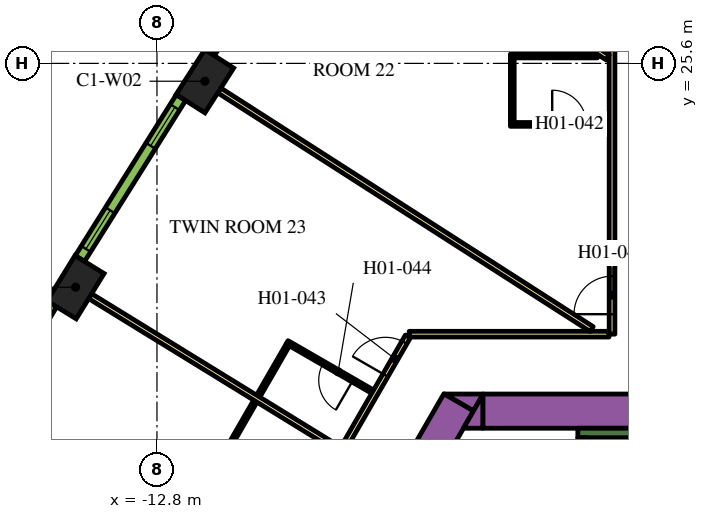
"""IFC4 building model, lengths in metres.
Left out: names, types, materials, properties, quantities, classifications, styles, units other than length and angle.
Written with IfcOpenShell. Run it as: python <this file> out.ifc"""

import sys

from ifc_helpers import new_model, si_unit, direction, frame, frame_2d, origin, origin_2d, place, context, subcontext, project, spatial, polyline, rectangle, outline, extrude, element, fill, save


model = new_model("IFC4")
c1 = context("Model", 3, precision=1e-05, world=origin(), true_north=direction((0.0, 1.0)))
c2 = subcontext(c1, "Body", "Model", "MODEL_VIEW")
j1 = project(units=[si_unit("LENGTHUNIT", "METRE"), si_unit("PLANEANGLEUNIT", "RADIAN")], contexts=[c1])
p1 = place(None, origin())
s1 = spatial("IfcSite", under=j1, at=p1, CompositionType="ELEMENT")
p2 = place(p1, origin())
s2 = spatial("IfcBuilding", under=s1, at=p2, CompositionType="ELEMENT")
p3 = place(p2, frame((0.0, 0.0, 35.4)))
s3 = spatial("IfcBuildingStorey", under=s2, at=p3, CompositionType="ELEMENT", Elevation=35.4)
for number, where, z_axis, x_axis in (
    (1, (-11.539, 25.131, 0.0), (0.0, 0.0, 1.0), (-0.539, -0.842, 0.0)),
    (2, (-14.942, 19.71, 0.0), (0.0, 0.0, 1.0), (-0.524, -0.852, 0.0)),
):
    element("IfcColumn", number, at=place(p3, frame(where, z_axis=z_axis, x_axis=x_axis)), inside=s3, PredefinedType="COLUMN", context=c2, shape_type="SweptSolid", body=[
        extrude(rectangle(XDim=1.4, YDim=0.9, at=origin_2d()), origin(), (0.0, 0.0, 1.0), 3.9),
    ])
p4 = place(p3, frame((-15.36, -1.503, 0.0), z_axis=(0.0, 0.0, 1.0), x_axis=(0.50000389221, 0.866023156604, 0.0)))
e3 = element("IfcWall", 3, at=p4, inside=s3, PredefinedType="SOLIDWALL", context=c2, shape_type="SweptSolid", body=[
    extrude(rectangle(XDim=21.0, YDim=0.9, at=frame_2d((10.5, 0.0))), origin(), (0.0, 0.0, 1.0), 3.9),
])
p5 = place(p3, origin())
e4 = element("IfcWall", 4, at=p5, inside=s3, PredefinedType="SOLIDWALL", context=c2, shape_type="SweptSolid", body=[
    extrude(outline(polyline([(-4.215, 16.9), (-4.469, 16.46), (-5.231, 16.9), (-4.215, 16.9)])), origin(), (0.0, 0.0, 1.0), 3.9),
])
p6 = place(p3, frame((-4.224, 16.45, 0.0), z_axis=(0.0, 0.0, 1.0), x_axis=(1.0, 0.0, 0.0)))
e5 = element("IfcWall", 5, at=p6, inside=s3, PredefinedType="SOLIDWALL", context=c2, shape_type="SweptSolid", body=[
    extrude(rectangle(XDim=9.488, YDim=0.9, at=frame_2d((4.744, 0.0))), origin(), (0.0, 0.0, 1.0), 3.9),
])
e6 = element("IfcWall", 6, at=p5, inside=s3, PredefinedType="SOLIDWALL", context=c2, shape_type="SweptSolid", body=[
    extrude(outline(polyline([(-4.734, 16.0), (-4.226, 16.88), (-4.226, 16.0), (-4.734, 16.0)])), origin(), (0.0, 0.0, 1.0), 3.9),
])
p7 = place(p3, frame((-1.725, 15.875, 0.0), z_axis=(0.0, 0.0, 1.0), x_axis=(1.0, 0.0, 0.0)))
e7 = element("IfcWall", 7, at=p7, inside=s3, PredefinedType="SOLIDWALL", context=c2, shape_type="SweptSolid", body=[
    extrude(rectangle(XDim=3.45, YDim=0.25, at=frame_2d((1.725, 0.0))), origin(), (0.0, 0.0, 1.0), 3.9),
])
p8 = place(p3, frame((-1.6, 8.7, 0.0), z_axis=(0.0, 0.0, 1.0), x_axis=(0.0, 1.0, 0.0)))
e8 = element("IfcWall", 8, at=p8, inside=s3, PredefinedType="SOLIDWALL", context=c2, shape_type="SweptSolid", body=[
    extrude(rectangle(XDim=7.05, YDim=0.25, at=frame_2d((3.525, 0.0))), origin(), (0.0, 0.0, 1.0), 3.9),
])
p9 = place(p3, frame((-0.825, 18.475, 0.0), z_axis=(0.0, 0.0, 1.0), x_axis=(0.0, 1.0, 0.0)))
e9 = element("IfcWall", 9, at=p9, inside=s3, PredefinedType="PARTITIONING", context=c2, shape_type="SweptSolid", body=[
    extrude(rectangle(XDim=16.224, YDim=0.15, at=frame_2d((8.112, 0.0))), origin(), (0.0, 0.0, 1.0), 2.75),
])
p10 = place(p9, frame((7.949, 0.0, 0.0)))
e10 = element("IfcOpeningElement", 10, at=p10, cuts=e9, PredefinedType="OPENING", context=c2, shape_type="SweptSolid", body=[
    extrude(rectangle(XDim=1.0, YDim=2.1, at=frame_2d((0.5, 1.05))), frame((0.0, 0.085, 0.0), z_axis=(0.0, -1.0, 0.0), x_axis=(1.0, 0.0, 0.0)), (0.0, 0.0, 1.0), 0.17),
])
p11 = place(p9, frame((0.526, 0.0, 0.0)))
e11 = element("IfcOpeningElement", 11, at=p11, cuts=e9, PredefinedType="OPENING", context=c2, shape_type="SweptSolid", body=[
    extrude(rectangle(XDim=1.0, YDim=2.1, at=frame_2d((0.5, 1.05))), frame((0.0, 0.085, 0.0), z_axis=(0.0, -1.0, 0.0), x_axis=(1.0, 0.0, 0.0)), (0.0, 0.0, 1.0), 0.17),
])
p12 = place(p3, frame((-6.163, 18.475, 0.0), z_axis=(0.0, 0.0, 1.0), x_axis=(1.0, 0.0, 0.0)))
e12 = element("IfcWall", 12, at=p12, inside=s3, PredefinedType="PARTITIONING", context=c2, shape_type="SweptSolid", body=[
    extrude(rectangle(XDim=5.258, YDim=0.15, at=frame_2d((2.629, 0.0))), origin(), (0.0, 0.0, 1.0), 2.75),
])
p13 = place(p3, frame((-19.081, -3.9, 0.0), z_axis=(0.0, 0.0, 1.0), x_axis=(0.499998313975, 0.866026377209, 0.0)))
e13 = element("IfcWall", 13, at=p13, inside=s3, PredefinedType="PARTITIONING", context=c2, shape_type="SweptSolid", body=[
    extrude(rectangle(XDim=25.766, YDim=0.15, at=frame_2d((12.883, 0.0))), origin(), (0.0, 0.0, 1.0), 2.75),
])
p14 = place(p13, frame((24.586, 0.0, 0.0)))
e14 = element("IfcOpeningElement", 14, at=p14, cuts=e13, PredefinedType="OPENING", context=c2, shape_type="SweptSolid", body=[
    extrude(rectangle(XDim=1.0, YDim=2.1, at=frame_2d((0.5, 1.05))), frame((0.0, 0.085, 0.0), z_axis=(0.0, -1.0, 0.0), x_axis=(1.0, 0.0, 0.0)), (0.0, 0.0, 1.0), 0.17),
])
p15 = place(p13, frame((16.196, 0.0, 0.0)))
e15 = element("IfcOpeningElement", 15, at=p15, cuts=e13, PredefinedType="OPENING", context=c2, shape_type="SweptSolid", body=[
    extrude(rectangle(XDim=1.0, YDim=2.1, at=frame_2d((0.5, 1.05))), frame((0.0, 0.085, 0.0), z_axis=(0.0, -1.0, 0.0), x_axis=(1.0, 0.0, 0.0)), (0.0, 0.0, 1.0), 0.17),
])
p16 = place(p13, frame((14.789, 0.0, 0.0)))
e16 = element("IfcOpeningElement", 16, at=p16, cuts=e13, PredefinedType="OPENING", context=c2, shape_type="SweptSolid", body=[
    extrude(rectangle(XDim=1.1, YDim=2.1, at=frame_2d((0.55, 1.05))), frame((0.0, 0.085, 0.0), z_axis=(0.0, -1.0, 0.0), x_axis=(1.0, 0.0, 0.0)), (0.0, 0.0, 1.0), 0.17),
])
p17 = place(p13, frame((3.698, 0.0, 0.0)))
e17 = element("IfcOpeningElement", 17, at=p17, cuts=e13, PredefinedType="OPENING", context=c2, shape_type="SweptSolid", body=[
    extrude(rectangle(XDim=1.0, YDim=2.1, at=frame_2d((0.5, 1.05))), frame((0.0, 0.085, 0.0), z_axis=(0.0, -1.0, 0.0), x_axis=(1.0, 0.0, 0.0)), (0.0, 0.0, 1.0), 0.17),
])
p18 = place(p13, frame((1.531, 0.0, 0.0)))
e18 = element("IfcOpeningElement", 18, at=p18, cuts=e13, PredefinedType="OPENING", context=c2, shape_type="SweptSolid", body=[
    extrude(rectangle(XDim=0.9, YDim=2.1, at=frame_2d((0.45, 1.05))), frame((0.0, 0.085, 0.0), z_axis=(0.0, -1.0, 0.0), x_axis=(1.0, 0.0, 0.0)), (0.0, 0.0, 1.0), 0.17),
])
p19 = place(p3, frame((-14.558, 19.475, 0.0), z_axis=(0.0, 0.0, 1.0), x_axis=(0.851829455142, -0.523819223925, 0.0)))
e19 = element("IfcWall", 19, at=p19, inside=s3, PredefinedType="PARTITIONING", context=c2, shape_type="SweptSolid", body=[
    extrude(rectangle(XDim=7.688, YDim=0.15, at=frame_2d((3.844, 0.0))), origin(), (0.0, 0.0, 1.0), 2.75),
])
p20 = place(p3, frame((-11.16, 24.888, 0.0), z_axis=(0.0, 0.0, 1.0), x_axis=(0.84199813156, -0.539480441211, 0.0)))
e20 = element("IfcWall", 20, at=p20, inside=s3, PredefinedType="PARTITIONING", context=c2, shape_type="SweptSolid", body=[
    extrude(rectangle(XDim=11.638, YDim=0.15, at=frame_2d((5.819, 0.0))), origin(), (0.0, 0.0, 1.0), 2.75),
])
p21 = place(p3, frame((-7.662, 30.238, 0.0), z_axis=(0.0, 0.0, 1.0), x_axis=(0.831882886825, -0.554951225431, 0.0)))
e21 = element("IfcWall", 21, at=p21, inside=s3, PredefinedType="PARTITIONING", context=c2, shape_type="SweptSolid", body=[
    extrude(rectangle(XDim=8.079, YDim=0.15, at=frame_2d((4.04, 0.0))), origin(), (0.0, 0.0, 1.0), 2.75),
])
p22 = place(p3, frame((-3.5, 23.995, 0.0), z_axis=(0.0, 0.0, 1.0), x_axis=(1.0, 0.0, 0.0)))
e22 = element("IfcWall", 22, at=p22, inside=s3, PredefinedType="PARTITIONING", context=c2, shape_type="SweptSolid", body=[
    extrude(rectangle(XDim=2.6, YDim=0.1, at=frame_2d((1.3, 0.0))), origin(), (0.0, 0.0, 1.0), 2.75),
])
p23 = place(p22, frame((1.1, 0.0, 0.0)))
e23 = element("IfcOpeningElement", 23, at=p23, cuts=e22, PredefinedType="OPENING", context=c2, shape_type="SweptSolid", body=[
    extrude(rectangle(XDim=0.9, YDim=2.1, at=frame_2d((0.45, 1.05))), frame((0.0, 0.06, 0.0), z_axis=(0.0, -1.0, 0.0), x_axis=(1.0, 0.0, 0.0)), (0.0, 0.0, 1.0), 0.12),
])
p24 = place(p3, frame((-3.45, 24.045, 0.0), z_axis=(0.0, 0.0, 1.0), x_axis=(0.0, 1.0, 0.0)))
e24 = element("IfcWall", 24, at=p24, inside=s3, PredefinedType="PARTITIONING", context=c2, shape_type="SweptSolid", body=[
    extrude(rectangle(XDim=1.7, YDim=0.1, at=frame_2d((0.85, 0.0))), origin(), (0.0, 0.0, 1.0), 2.75),
])
p25 = place(p3, frame((-1.21, 25.795, 0.0), z_axis=(0.0, 0.0, 1.0), x_axis=(-1.0, 0.0, 0.0)))
e25 = element("IfcWall", 25, at=p25, inside=s3, PredefinedType="PARTITIONING", context=c2, shape_type="SweptSolid", body=[
    extrude(rectangle(XDim=2.29, YDim=0.1, at=frame_2d((1.145, 0.0))), origin(), (0.0, 0.0, 1.0), 2.75),
])
p26 = place(p3, frame((-7.124, 16.961, 0.0), z_axis=(0.0, 0.0, 1.0), x_axis=(-0.866021400173, 0.500006934395, 0.0)))
e26 = element("IfcWall", 26, at=p26, inside=s3, PredefinedType="PARTITIONING", context=c2, shape_type="SweptSolid", body=[
    extrude(rectangle(XDim=2.6, YDim=0.1, at=frame_2d((1.3, 0.0))), origin(), (0.0, 0.0, 1.0), 2.75),
])
p27 = place(p26, frame((0.6, 0.0, 0.0)))
e27 = element("IfcOpeningElement", 27, at=p27, cuts=e26, PredefinedType="OPENING", context=c2, shape_type="SweptSolid", body=[
    extrude(rectangle(XDim=0.9, YDim=2.1, at=frame_2d((0.45, 1.05))), frame((0.0, 0.06, 0.0), z_axis=(0.0, -1.0, 0.0), x_axis=(1.0, 0.0, 0.0)), (0.0, 0.0, 1.0), 0.12),
])
p28 = place(p3, frame((-9.362, 18.184, 0.0), z_axis=(0.0, 0.0, 1.0), x_axis=(-0.499992328818, -0.866029832698, 0.0)))
e28 = element("IfcWall", 28, at=p28, inside=s3, PredefinedType="PARTITIONING", context=c2, shape_type="SweptSolid", body=[
    extrude(rectangle(XDim=1.54, YDim=0.1, at=frame_2d((0.77, 0.0))), origin(), (0.0, 0.0, 1.0), 2.75),
])
p29 = place(p3, frame((-11.061, 15.242, 0.0), z_axis=(0.0, 0.0, 1.0), x_axis=(0.499976720371, 0.866038843867, 0.0)))
e29 = element("IfcWall", 29, at=p29, inside=s3, PredefinedType="PARTITIONING", context=c2, shape_type="SweptSolid", body=[
    extrude(rectangle(XDim=1.69, YDim=0.1, at=frame_2d((0.845, 0.0))), origin(), (0.0, 0.0, 1.0), 2.75),
])
p30 = place(p3, frame((-8.676, 30.068, 0.0), z_axis=(0.0, 0.0, 1.0), x_axis=(-0.547204617628, -0.836998868845, 0.0)))
e30 = element("IfcWall", 30, at=p30, inside=s3, PredefinedType="SOLIDWALL", context=c2, shape_type="SweptSolid", body=[
    extrude(rectangle(XDim=4.998, YDim=0.29, at=frame_2d((2.499, 0.0))), origin(), (0.0, 0.0, 1.0), 3.65),
])
p31 = place(p30, frame((0.297, 0.0, 0.9)))
e31 = element("IfcOpeningElement", 31, at=p31, cuts=e30, PredefinedType="OPENING", context=c2, shape_type="SweptSolid", body=[
    extrude(rectangle(XDim=1.2, YDim=2.15, at=frame_2d((0.6, 1.075))), frame((0.0, 0.155, 0.0), z_axis=(0.0, -1.0, 0.0), x_axis=(1.0, 0.0, 0.0)), (0.0, 0.0, 1.0), 0.31),
])
p32 = place(p30, frame((3.501, 0.0, 0.9)))
e32 = element("IfcOpeningElement", 32, at=p32, cuts=e30, PredefinedType="OPENING", context=c2, shape_type="SweptSolid", body=[
    extrude(rectangle(XDim=1.2, YDim=2.15, at=frame_2d((0.6, 1.075))), frame((0.0, 0.155, 0.0), z_axis=(0.0, -1.0, 0.0), x_axis=(1.0, 0.0, 0.0)), (0.0, 0.0, 1.0), 0.31),
])
p33 = place(p3, frame((-12.17, 24.699, 0.0), z_axis=(0.0, 0.0, 1.0), x_axis=(-0.531688286542, -0.846940119462, 0.0)))
e33 = element("IfcWall", 33, at=p33, inside=s3, PredefinedType="SOLIDWALL", context=c2, shape_type="SweptSolid", body=[
    extrude(rectangle(XDim=4.998, YDim=0.29, at=frame_2d((2.499, 0.0))), origin(), (0.0, 0.0, 1.0), 3.65),
])
p34 = place(p33, frame((0.297, 0.0, 0.9)))
e34 = element("IfcOpeningElement", 34, at=p34, cuts=e33, PredefinedType="OPENING", context=c2, shape_type="SweptSolid", body=[
    extrude(rectangle(XDim=1.2, YDim=2.15, at=frame_2d((0.6, 1.075))), frame((0.0, 0.155, 0.0), z_axis=(0.0, -1.0, 0.0), x_axis=(1.0, 0.0, 0.0)), (0.0, 0.0, 1.0), 0.31),
])
p35 = place(p33, frame((3.501, 0.0, 0.9)))
e35 = element("IfcOpeningElement", 35, at=p35, cuts=e33, PredefinedType="OPENING", context=c2, shape_type="SweptSolid", body=[
    extrude(rectangle(XDim=1.2, YDim=2.15, at=frame_2d((0.6, 1.075))), frame((0.0, 0.155, 0.0), z_axis=(0.0, -1.0, 0.0), x_axis=(1.0, 0.0, 0.0)), (0.0, 0.0, 1.0), 0.31),
])
p36 = place(p3, frame((-15.564, 19.267, 0.0), z_axis=(0.0, 0.0, 1.0), x_axis=(-0.515938796285, -0.856625448191, 0.0)))
e36 = element("IfcWall", 36, at=p36, inside=s3, PredefinedType="SOLIDWALL", context=c2, shape_type="SweptSolid", body=[
    extrude(rectangle(XDim=4.998, YDim=0.29, at=frame_2d((2.499, 0.0))), origin(), (0.0, 0.0, 1.0), 3.65),
])
p37 = place(p36, frame((0.297, 0.0, 0.9)))
e37 = element("IfcOpeningElement", 37, at=p37, cuts=e36, PredefinedType="OPENING", context=c2, shape_type="SweptSolid", body=[
    extrude(rectangle(XDim=1.2, YDim=2.15, at=frame_2d((0.6, 1.075))), frame((0.0, 0.155, 0.0), z_axis=(0.0, -1.0, 0.0), x_axis=(1.0, 0.0, 0.0)), (0.0, 0.0, 1.0), 0.31),
])
p38 = place(p36, frame((3.501, 0.0, 0.9)))
e38 = element("IfcOpeningElement", 38, at=p38, cuts=e36, PredefinedType="OPENING", context=c2, shape_type="SweptSolid", body=[
    extrude(rectangle(XDim=1.2, YDim=2.15, at=frame_2d((0.6, 1.075))), frame((0.0, 0.155, 0.0), z_axis=(0.0, -1.0, 0.0), x_axis=(1.0, 0.0, 0.0)), (0.0, 0.0, 1.0), 0.31),
])
p39 = place(p11, origin())
e39 = element("IfcDoor", 39, at=p39, inside=s3, OperationType="SINGLE_SWING_LEFT", PredefinedType="DOOR", context=c2, shape_type="SweptSolid", body=[
    extrude(rectangle(XDim=1.0, YDim=2.1, at=frame_2d((0.5, 1.05))), frame((0.0, 0.025, 0.0), z_axis=(0.0, -1.0, 0.0), x_axis=(1.0, 0.0, 0.0)), (0.0, 0.0, 1.0), 0.05),
])
fill(e11, e39)
p40 = place(p23, origin())
e40 = element("IfcDoor", 40, at=p40, inside=s3, OperationType="SINGLE_SWING_LEFT", PredefinedType="DOOR", context=c2, shape_type="SweptSolid", body=[
    extrude(rectangle(XDim=0.9, YDim=2.1, at=frame_2d((0.45, 1.05))), frame((0.0, 0.025, 0.0), z_axis=(0.0, -1.0, 0.0), x_axis=(1.0, 0.0, 0.0)), (0.0, 0.0, 1.0), 0.05),
])
fill(e23, e40)
p41 = place(p14, origin())
e41 = element("IfcDoor", 41, at=p41, inside=s3, OperationType="SINGLE_SWING_RIGHT", PredefinedType="DOOR", context=c2, shape_type="SweptSolid", body=[
    extrude(rectangle(XDim=1.0, YDim=2.1, at=frame_2d((0.5, 1.05))), frame((0.0, 0.025, 0.0), z_axis=(0.0, -1.0, 0.0), x_axis=(1.0, 0.0, 0.0)), (0.0, 0.0, 1.0), 0.05),
])
fill(e14, e41)
p42 = place(p27, origin())
e42 = element("IfcDoor", 42, at=p42, inside=s3, OperationType="SINGLE_SWING_LEFT", PredefinedType="DOOR", context=c2, shape_type="SweptSolid", body=[
    extrude(rectangle(XDim=0.9, YDim=2.1, at=frame_2d((0.45, 1.05))), frame((0.0, 0.025, 0.0), z_axis=(0.0, -1.0, 0.0), x_axis=(1.0, 0.0, 0.0)), (0.0, 0.0, 1.0), 0.05),
])
fill(e27, e42)
p43 = place(p34, origin())
e43 = element("IfcWindow", 43, at=p43, inside=s3, PartitioningType="DOUBLE_PANEL_VERTICAL", PredefinedType="WINDOW", context=c2, shape_type="SweptSolid", body=[
    extrude(rectangle(XDim=1.2, YDim=2.15, at=frame_2d((0.6, 1.075))), frame((0.0, 0.015, 0.0), z_axis=(0.0, -1.0, 0.0), x_axis=(1.0, 0.0, 0.0)), (0.0, 0.0, 1.0), 0.06),
])
fill(e34, e43)
p44 = place(p35, origin())
e44 = element("IfcWindow", 44, at=p44, inside=s3, PartitioningType="DOUBLE_PANEL_VERTICAL", PredefinedType="WINDOW", context=c2, shape_type="SweptSolid", body=[
    extrude(rectangle(XDim=1.2, YDim=2.15, at=frame_2d((0.6, 1.075))), frame((0.0, 0.015, 0.0), z_axis=(0.0, -1.0, 0.0), x_axis=(1.0, 0.0, 0.0)), (0.0, 0.0, 1.0), 0.06),
])
fill(e35, e44)
save(model, sys.argv[1])
